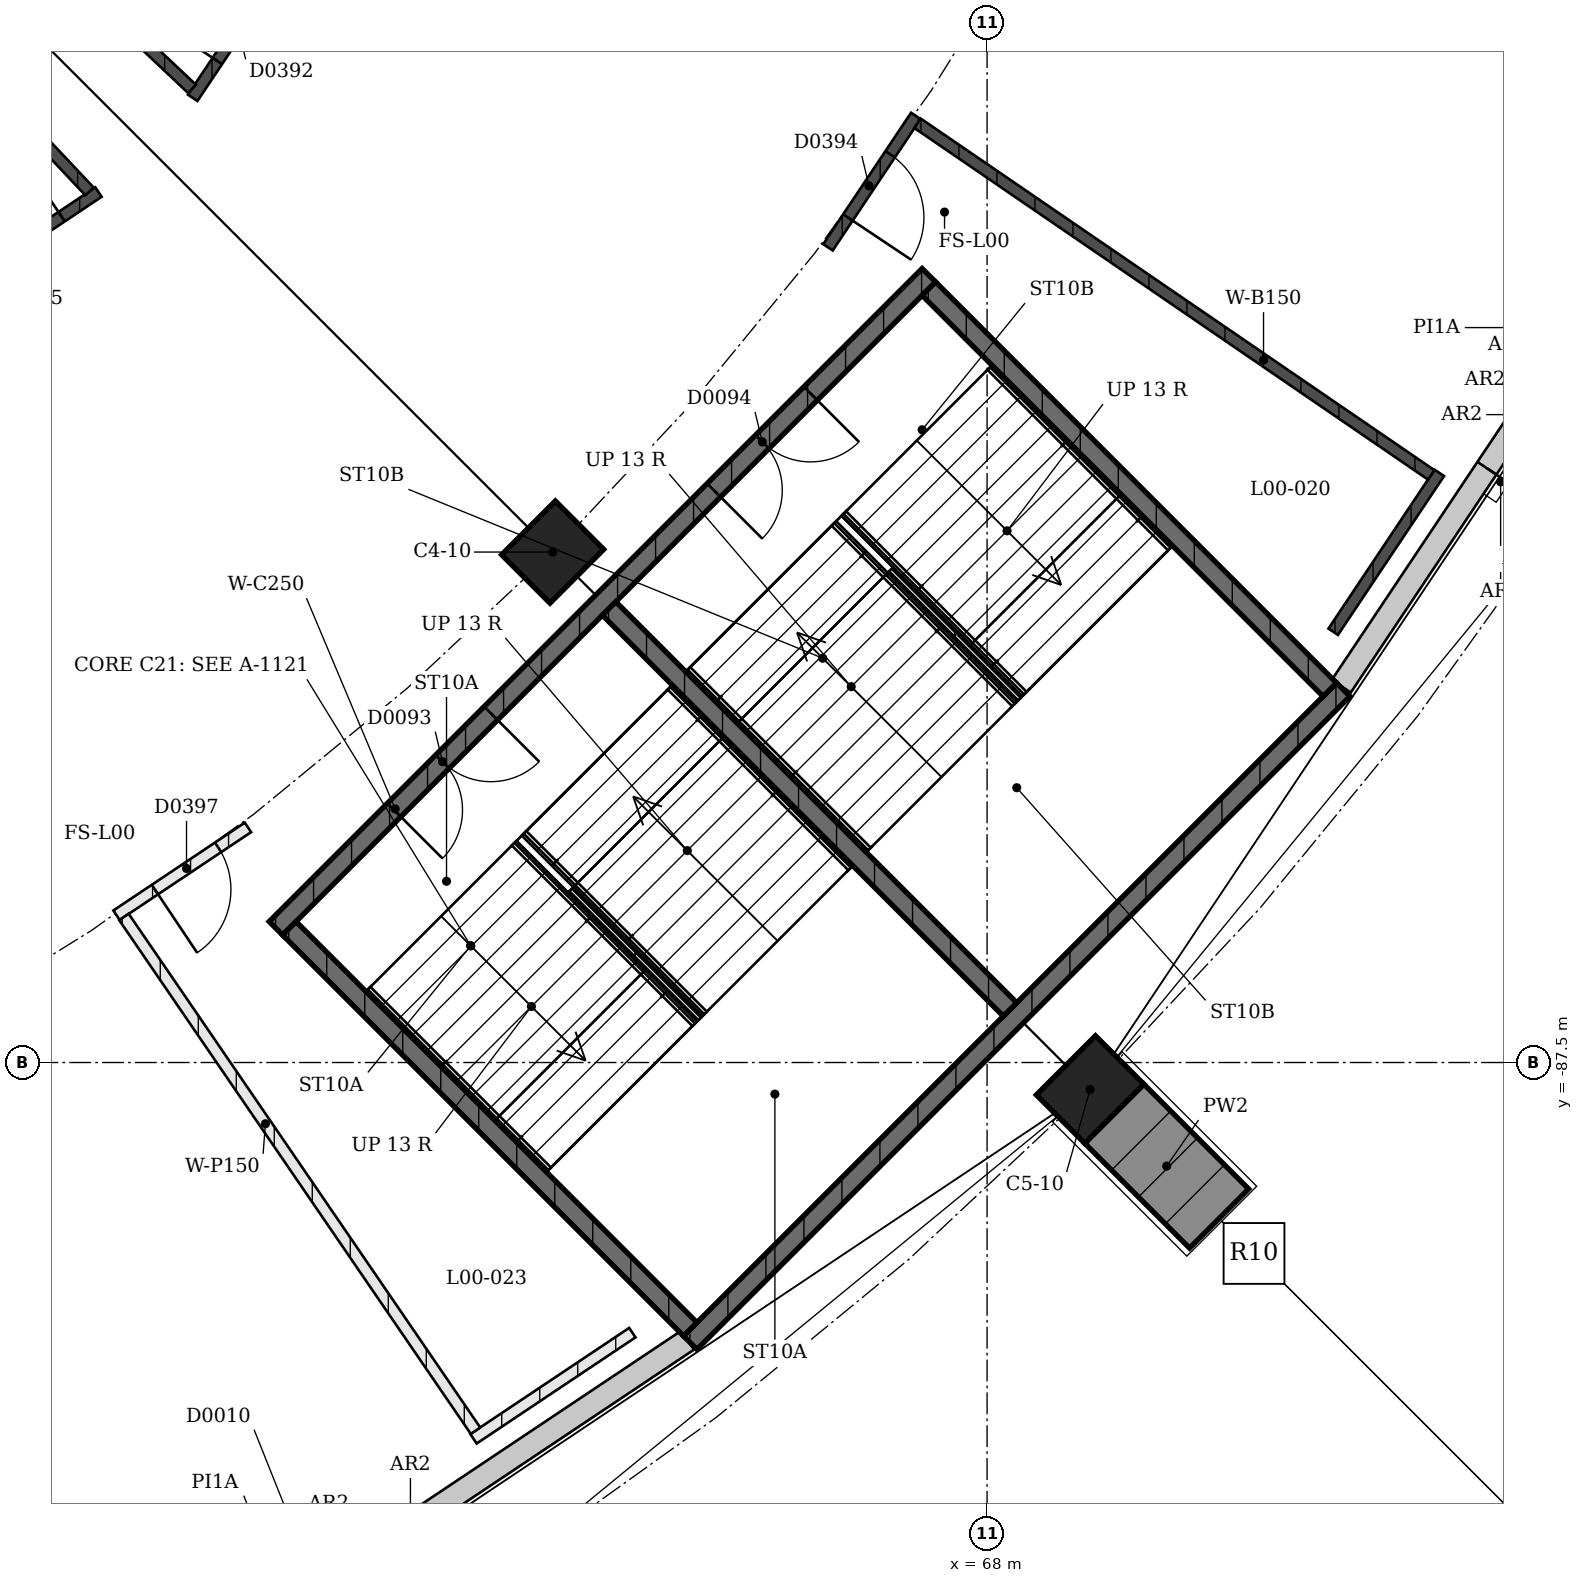
"""IFC4 building model, lengths in metres.
Left out: names, types, materials, properties, quantities, classifications, styles, units other than length and angle.
Written with IfcOpenShell. Run it as: python <this file> out.ifc"""

import sys

from ifc_helpers import new_model, si_unit, direction, frame, frame_2d, origin, origin_2d, place, context, subcontext, project, spatial, rectangle, extrude, element, fill, save


model = new_model("IFC4")
c1 = context("Model", 3, precision=1e-05, world=origin(), true_north=direction((0.0, 1.0)))
c2 = subcontext(c1, "Body", "Model", "MODEL_VIEW")
j1 = project(units=[si_unit("LENGTHUNIT", "METRE"), si_unit("PLANEANGLEUNIT", "RADIAN")], contexts=[c1])
p1 = place(None, origin())
s1 = spatial("IfcSite", under=j1, at=p1, CompositionType="ELEMENT")
p2 = place(p1, origin())
s2 = spatial("IfcBuilding", under=s1, at=p2, CompositionType="ELEMENT")
p3 = place(p2, origin())
s3 = spatial("IfcBuildingStorey", under=s2, at=p3, CompositionType="ELEMENT", Elevation=0.0)
p4 = place(p3, frame((62.284, -80.784, 0.0), z_axis=(0.0, 0.0, 1.0), x_axis=(0.707106781187, 0.707106781187, 0.0)))
e1 = element("IfcColumn", 1, at=p4, inside=s3, PredefinedType="COLUMN", context=c2, shape_type="SweptSolid", body=[
    extrude(rectangle(XDim=1.0, YDim=0.9, at=origin_2d()), origin(), (0.0, 0.0, 1.0), 4.5),
])
p5 = place(p3, frame((69.355, -87.855, 0.0), z_axis=(0.0, 0.0, 1.0), x_axis=(0.707106781187, 0.707106781187, 0.0)))
e2 = element("IfcColumn", 2, at=p5, inside=s3, PredefinedType="COLUMN", context=c2, shape_type="SweptSolid", body=[
    extrude(rectangle(XDim=1.1, YDim=0.9, at=origin_2d()), origin(), (0.0, 0.0, 1.0), 4.5),
])
p6 = place(p3, frame((79.694, -72.022, 0.0), z_axis=(0.0, 0.0, 1.0), x_axis=(-0.555581029899, -0.831462397957, 0.0)))
e3 = element("IfcWall", 3, at=p6, inside=s3, PredefinedType="SOLIDWALL", context=c2, shape_type="SweptSolid", body=[
    extrude(rectangle(XDim=12.66, YDim=0.3, at=frame_2d((6.33, 0.0))), origin(), (0.0, 0.0, 1.0), 2.79),
])
p7 = place(p6, frame((4.412, 0.0, 0.0)))
e4 = element("IfcOpeningElement", 4, at=p7, cuts=e3, PredefinedType="OPENING", context=c2, shape_type="SweptSolid", body=[
    extrude(rectangle(XDim=4.8, YDim=2.4, at=frame_2d((2.4, 1.2))), frame((0.0, 0.16, 0.0), z_axis=(0.0, -1.0, 0.0), x_axis=(1.0, 0.0, 0.0)), (0.0, 0.0, 1.0), 0.32),
])
p8 = place(p3, frame((64.061, -91.152, 0.0), z_axis=(0.0, 0.0, 1.0), x_axis=(-0.831466044974, -0.555575571867, 0.0)))
e5 = element("IfcWall", 5, at=p8, inside=s3, PredefinedType="SOLIDWALL", context=c2, shape_type="SweptSolid", body=[
    extrude(rectangle(XDim=12.675, YDim=0.3, at=frame_2d((6.337, 0.0))), origin(), (0.0, 0.0, 1.0), 2.79),
])
p9 = place(p8, frame((4.363, 0.0, 0.0)))
e6 = element("IfcOpeningElement", 6, at=p9, cuts=e5, PredefinedType="OPENING", context=c2, shape_type="SweptSolid", body=[
    extrude(rectangle(XDim=3.0, YDim=2.4, at=frame_2d((1.5, 1.2))), frame((0.0, 0.16, 0.0), z_axis=(0.0, -1.0, 0.0), x_axis=(1.0, 0.0, 0.0)), (0.0, 0.0, 1.0), 0.32),
])
p10 = place(p3, frame((58.643, -85.734, 0.0), z_axis=(0.0, 0.0, 1.0), x_axis=(0.707106781187, 0.707106781187, 0.0)))
e7 = element("IfcWall", 7, at=p10, inside=s3, PredefinedType="SHEAR", context=c2, shape_type="SweptSolid", body=[
    extrude(rectangle(XDim=12.15, YDim=0.25, at=frame_2d((6.075, 0.0))), origin(), (0.0, 0.0, 1.0), 4.09),
])
p11 = place(p10, frame((2.2, 0.0, 0.0)))
e8 = element("IfcOpeningElement", 8, at=p11, cuts=e7, PredefinedType="OPENING", context=c2, shape_type="SweptSolid", body=[
    extrude(rectangle(XDim=1.8, YDim=2.1, at=frame_2d((0.9, 1.05))), frame((0.0, 0.125, 0.0), z_axis=(0.0, -1.0, 0.0), x_axis=(1.0, 0.0, 0.0)), (0.0, 0.0, 1.0), 0.25),
])
p12 = place(p10, frame((8.15, 0.0, 0.0)))
e9 = element("IfcOpeningElement", 9, at=p12, cuts=e7, PredefinedType="OPENING", context=c2, shape_type="SweptSolid", body=[
    extrude(rectangle(XDim=1.8, YDim=2.1, at=frame_2d((0.9, 1.05))), frame((0.0, 0.125, 0.0), z_axis=(0.0, -1.0, 0.0), x_axis=(1.0, 0.0, 0.0)), (0.0, 0.0, 1.0), 0.25),
])
p13 = place(p3, frame((64.094, -91.186, 0.0), z_axis=(0.0, 0.0, 1.0), x_axis=(0.707106781187, 0.707106781187, 0.0)))
e10 = element("IfcWall", 10, at=p13, inside=s3, PredefinedType="SHEAR", context=c2, shape_type="SweptSolid", body=[
    extrude(rectangle(XDim=12.15, YDim=0.25, at=frame_2d((6.075, 0.0))), origin(), (0.0, 0.0, 1.0), 4.09),
])
for number, where, z_axis, x_axis in (
    (11, (58.819, -85.734, 0.0), (0.0, 0.0, 1.0), (0.707, -0.707, 0.0)),
    (12, (67.234, -77.319, 0.0), (0.0, 0.0, 1.0), (0.707, -0.707, 0.0)),
):
    element("IfcWall", number, at=place(p3, frame(where, z_axis=z_axis, x_axis=x_axis)), inside=s3, PredefinedType="SHEAR", context=c2, shape_type="SweptSolid", body=[
        extrude(rectangle(XDim=7.46, YDim=0.25, at=frame_2d((3.73, 0.0))), origin(), (0.0, 0.0, 1.0), 4.09),
    ])
p14 = place(p3, frame((63.027, -81.527, 0.0), z_axis=(0.0, 0.0, 1.0), x_axis=(0.707106781187, -0.707106781187, 0.0)))
e13 = element("IfcWall", 13, at=p14, inside=s3, PredefinedType="SHEAR", context=c2, shape_type="SweptSolid", body=[
    extrude(rectangle(XDim=7.46, YDim=0.25, at=frame_2d((3.73, 0.0))), origin(), (0.0, 0.0, 1.0), 4.09),
])
p15 = place(p3, frame((57.548, -74.809, 0.0), z_axis=(0.0, 0.0, 1.0), x_axis=(0.555584101735, 0.831460345356, 0.0)))
e14 = element("IfcWall", 14, at=p15, inside=s3, PredefinedType="SOLIDWALL", context=c2, shape_type="SweptSolid", body=[
    extrude(rectangle(XDim=2.167, YDim=0.15, at=frame_2d((1.083, 0.0))), origin(), (0.0, 0.0, 1.0), 3.0),
])
p16 = place(p15, frame((0.583, 0.0, 0.0)))
e15 = element("IfcOpeningElement", 15, at=p16, cuts=e14, PredefinedType="OPENING", context=c2, shape_type="SweptSolid", body=[
    extrude(rectangle(XDim=1.0, YDim=2.1, at=frame_2d((0.5, 1.05))), frame((0.0, 0.075, 0.0), z_axis=(0.0, -1.0, 0.0), x_axis=(1.0, 0.0, 0.0)), (0.0, 0.0, 1.0), 0.15),
])
p17 = place(p3, frame((53.975, -71.33, 0.0), z_axis=(0.0, 0.0, 1.0), x_axis=(0.727681801846, -0.685914860068, 0.0)))
e16 = element("IfcWall", 16, at=p17, inside=s3, PredefinedType="SOLIDWALL", context=c2, shape_type="SweptSolid", body=[
    extrude(rectangle(XDim=4.898, YDim=0.15, at=frame_2d((2.449, 0.0))), origin(), (0.0, 0.0, 1.0), 3.0),
])
p18 = place(p3, frame((65.907, -76.775, 0.0), z_axis=(0.0, 0.0, 1.0), x_axis=(0.555485387307, 0.831526298134, 0.0)))
e17 = element("IfcWall", 17, at=p18, inside=s3, PredefinedType="SOLIDWALL", context=c2, shape_type="SweptSolid", body=[
    extrude(rectangle(XDim=2.08, YDim=0.15, at=frame_2d((1.04, 0.0))), origin(), (0.0, 0.0, 1.0), 3.0),
])
p19 = place(p18, frame((0.472, 0.0, 0.0)))
e18 = element("IfcOpeningElement", 18, at=p19, cuts=e17, PredefinedType="OPENING", context=c2, shape_type="SweptSolid", body=[
    extrude(rectangle(XDim=1.0, YDim=2.1, at=frame_2d((0.5, 1.05))), frame((0.0, 0.075, 0.0), z_axis=(0.0, -1.0, 0.0), x_axis=(1.0, 0.0, 0.0)), (0.0, 0.0, 1.0), 0.15),
])
p20 = place(p3, frame((72.554, -81.833, 0.0), z_axis=(0.0, 0.0, 1.0), x_axis=(0.555551611961, 0.831482054195, 0.0)))
e19 = element("IfcWall", 19, at=p20, inside=s3, PredefinedType="SOLIDWALL", context=c2, shape_type="SweptSolid", body=[
    extrude(rectangle(XDim=2.514, YDim=0.15, at=frame_2d((1.257, 0.0))), origin(), (0.0, 0.0, 1.0), 3.0),
])
p21 = place(p3, frame((67.085, -75.144, 0.0), z_axis=(0.0, 0.0, 1.0), x_axis=(0.825237791444, -0.564785434986, 0.0)))
e20 = element("IfcWall", 20, at=p21, inside=s3, PredefinedType="SOLIDWALL", context=c2, shape_type="SweptSolid", body=[
    extrude(rectangle(XDim=8.19, YDim=0.15, at=frame_2d((4.095, 0.0))), origin(), (0.0, 0.0, 1.0), 3.0),
])
p22 = place(p3, frame((56.309, -76.048, 0.0), z_axis=(0.0, 0.0, 1.0), x_axis=(-0.831460345356, -0.555584101735, 0.0)))
e21 = element("IfcWall", 21, at=p22, inside=s3, PredefinedType="SOLIDWALL", context=c2, shape_type="SweptSolid", body=[
    extrude(rectangle(XDim=2.167, YDim=0.15, at=frame_2d((1.083, 0.0))), origin(), (0.0, 0.0, 1.0), 3.0),
])
p23 = place(p22, frame((0.583, 0.0, 0.0)))
e22 = element("IfcOpeningElement", 22, at=p23, cuts=e21, PredefinedType="OPENING", context=c2, shape_type="SweptSolid", body=[
    extrude(rectangle(XDim=1.0, YDim=2.1, at=frame_2d((0.5, 1.05))), frame((0.0, 0.075, 0.0), z_axis=(0.0, -1.0, 0.0), x_axis=(1.0, 0.0, 0.0)), (0.0, 0.0, 1.0), 0.15),
])
p24 = place(p3, frame((52.83, -72.475, 0.0), z_axis=(0.0, 0.0, 1.0), x_axis=(0.685914860068, -0.727681801846, 0.0)))
e23 = element("IfcWall", 23, at=p24, inside=s3, PredefinedType="SOLIDWALL", context=c2, shape_type="SweptSolid", body=[
    extrude(rectangle(XDim=4.898, YDim=0.15, at=frame_2d((2.449, 0.0))), origin(), (0.0, 0.0, 1.0), 3.0),
])
p25 = place(p3, frame((58.275, -84.407, 0.0), z_axis=(0.0, 0.0, 1.0), x_axis=(-0.831526298134, -0.555485387307, 0.0)))
e24 = element("IfcWall", 24, at=p25, inside=s3, PredefinedType="PARTITIONING", context=c2, shape_type="SweptSolid", body=[
    extrude(rectangle(XDim=2.08, YDim=0.15, at=frame_2d((1.04, 0.0))), origin(), (0.0, 0.0, 1.0), 3.0),
])
p26 = place(p25, frame((0.472, 0.0, 0.0)))
e25 = element("IfcOpeningElement", 25, at=p26, cuts=e24, PredefinedType="OPENING", context=c2, shape_type="SweptSolid", body=[
    extrude(rectangle(XDim=1.0, YDim=2.1, at=frame_2d((0.5, 1.05))), frame((0.0, 0.075, 0.0), z_axis=(0.0, -1.0, 0.0), x_axis=(1.0, 0.0, 0.0)), (0.0, 0.0, 1.0), 0.15),
])
p27 = place(p3, frame((63.333, -91.054, 0.0), z_axis=(0.0, 0.0, 1.0), x_axis=(-0.831482054195, -0.555551611961, 0.0)))
e26 = element("IfcWall", 26, at=p27, inside=s3, PredefinedType="PARTITIONING", context=c2, shape_type="SweptSolid", body=[
    extrude(rectangle(XDim=2.514, YDim=0.15, at=frame_2d((1.257, 0.0))), origin(), (0.0, 0.0, 1.0), 3.0),
])
p28 = place(p3, frame((56.644, -85.585, 0.0), z_axis=(0.0, 0.0, 1.0), x_axis=(0.564785434986, -0.825237791444, 0.0)))
e27 = element("IfcWall", 27, at=p28, inside=s3, PredefinedType="PARTITIONING", context=c2, shape_type="SweptSolid", body=[
    extrude(rectangle(XDim=8.19, YDim=0.15, at=frame_2d((4.095, 0.0))), origin(), (0.0, 0.0, 1.0), 3.0),
])
p29 = place(p7, origin())
e28 = element("IfcDoor", 28, at=p29, inside=s3, OperationType="DOUBLE_DOOR_SINGLE_SWING", PredefinedType="DOOR", context=c2, shape_type="SweptSolid", body=[
    extrude(rectangle(XDim=4.8, YDim=2.4, at=frame_2d((2.4, 1.2))), frame((0.0, 0.025, 0.0), z_axis=(0.0, -1.0, 0.0), x_axis=(1.0, 0.0, 0.0)), (0.0, 0.0, 1.0), 0.05),
])
fill(e4, e28)
p30 = place(p11, origin())
e29 = element("IfcDoor", 29, at=p30, inside=s3, OperationType="DOUBLE_DOOR_SINGLE_SWING", PredefinedType="DOOR", context=c2, shape_type="SweptSolid", body=[
    extrude(rectangle(XDim=1.8, YDim=2.1, at=frame_2d((0.9, 1.05))), frame((0.0, 0.025, 0.0), z_axis=(0.0, -1.0, 0.0), x_axis=(1.0, 0.0, 0.0)), (0.0, 0.0, 1.0), 0.05),
])
fill(e8, e29)
p31 = place(p12, origin())
e30 = element("IfcDoor", 30, at=p31, inside=s3, OperationType="DOUBLE_DOOR_SINGLE_SWING", PredefinedType="DOOR", context=c2, shape_type="SweptSolid", body=[
    extrude(rectangle(XDim=1.8, YDim=2.1, at=frame_2d((0.9, 1.05))), frame((0.0, 0.025, 0.0), z_axis=(0.0, -1.0, 0.0), x_axis=(1.0, 0.0, 0.0)), (0.0, 0.0, 1.0), 0.05),
])
fill(e9, e30)
p32 = place(p16, origin())
e31 = element("IfcDoor", 31, at=p32, inside=s3, OperationType="SINGLE_SWING_RIGHT", PredefinedType="DOOR", context=c2, shape_type="SweptSolid", body=[
    extrude(rectangle(XDim=1.0, YDim=2.1, at=frame_2d((0.5, 1.05))), frame((0.0, 0.025, 0.0), z_axis=(0.0, -1.0, 0.0), x_axis=(1.0, 0.0, 0.0)), (0.0, 0.0, 1.0), 0.05),
])
fill(e15, e31)
p33 = place(p19, origin())
e32 = element("IfcDoor", 32, at=p33, inside=s3, OperationType="SINGLE_SWING_LEFT", PredefinedType="DOOR", context=c2, shape_type="SweptSolid", body=[
    extrude(rectangle(XDim=1.0, YDim=2.1, at=frame_2d((0.5, 1.05))), frame((0.0, 0.025, 0.0), z_axis=(0.0, -1.0, 0.0), x_axis=(1.0, 0.0, 0.0)), (0.0, 0.0, 1.0), 0.05),
])
fill(e18, e32)
p34 = place(p23, origin())
e33 = element("IfcDoor", 33, at=p34, inside=s3, OperationType="SINGLE_SWING_LEFT", PredefinedType="DOOR", context=c2, shape_type="SweptSolid", body=[
    extrude(rectangle(XDim=1.0, YDim=2.1, at=frame_2d((0.5, 1.05))), frame((0.0, 0.025, 0.0), z_axis=(0.0, -1.0, 0.0), x_axis=(1.0, 0.0, 0.0)), (0.0, 0.0, 1.0), 0.05),
])
fill(e22, e33)
p35 = place(p26, origin())
e34 = element("IfcDoor", 34, at=p35, inside=s3, OperationType="SINGLE_SWING_LEFT", PredefinedType="DOOR", context=c2, shape_type="SweptSolid", body=[
    extrude(rectangle(XDim=1.0, YDim=2.1, at=frame_2d((0.5, 1.05))), frame((0.0, 0.025, 0.0), z_axis=(0.0, -1.0, 0.0), x_axis=(1.0, 0.0, 0.0)), (0.0, 0.0, 1.0), 0.05),
])
fill(e25, e34)
save(model, sys.argv[1])
